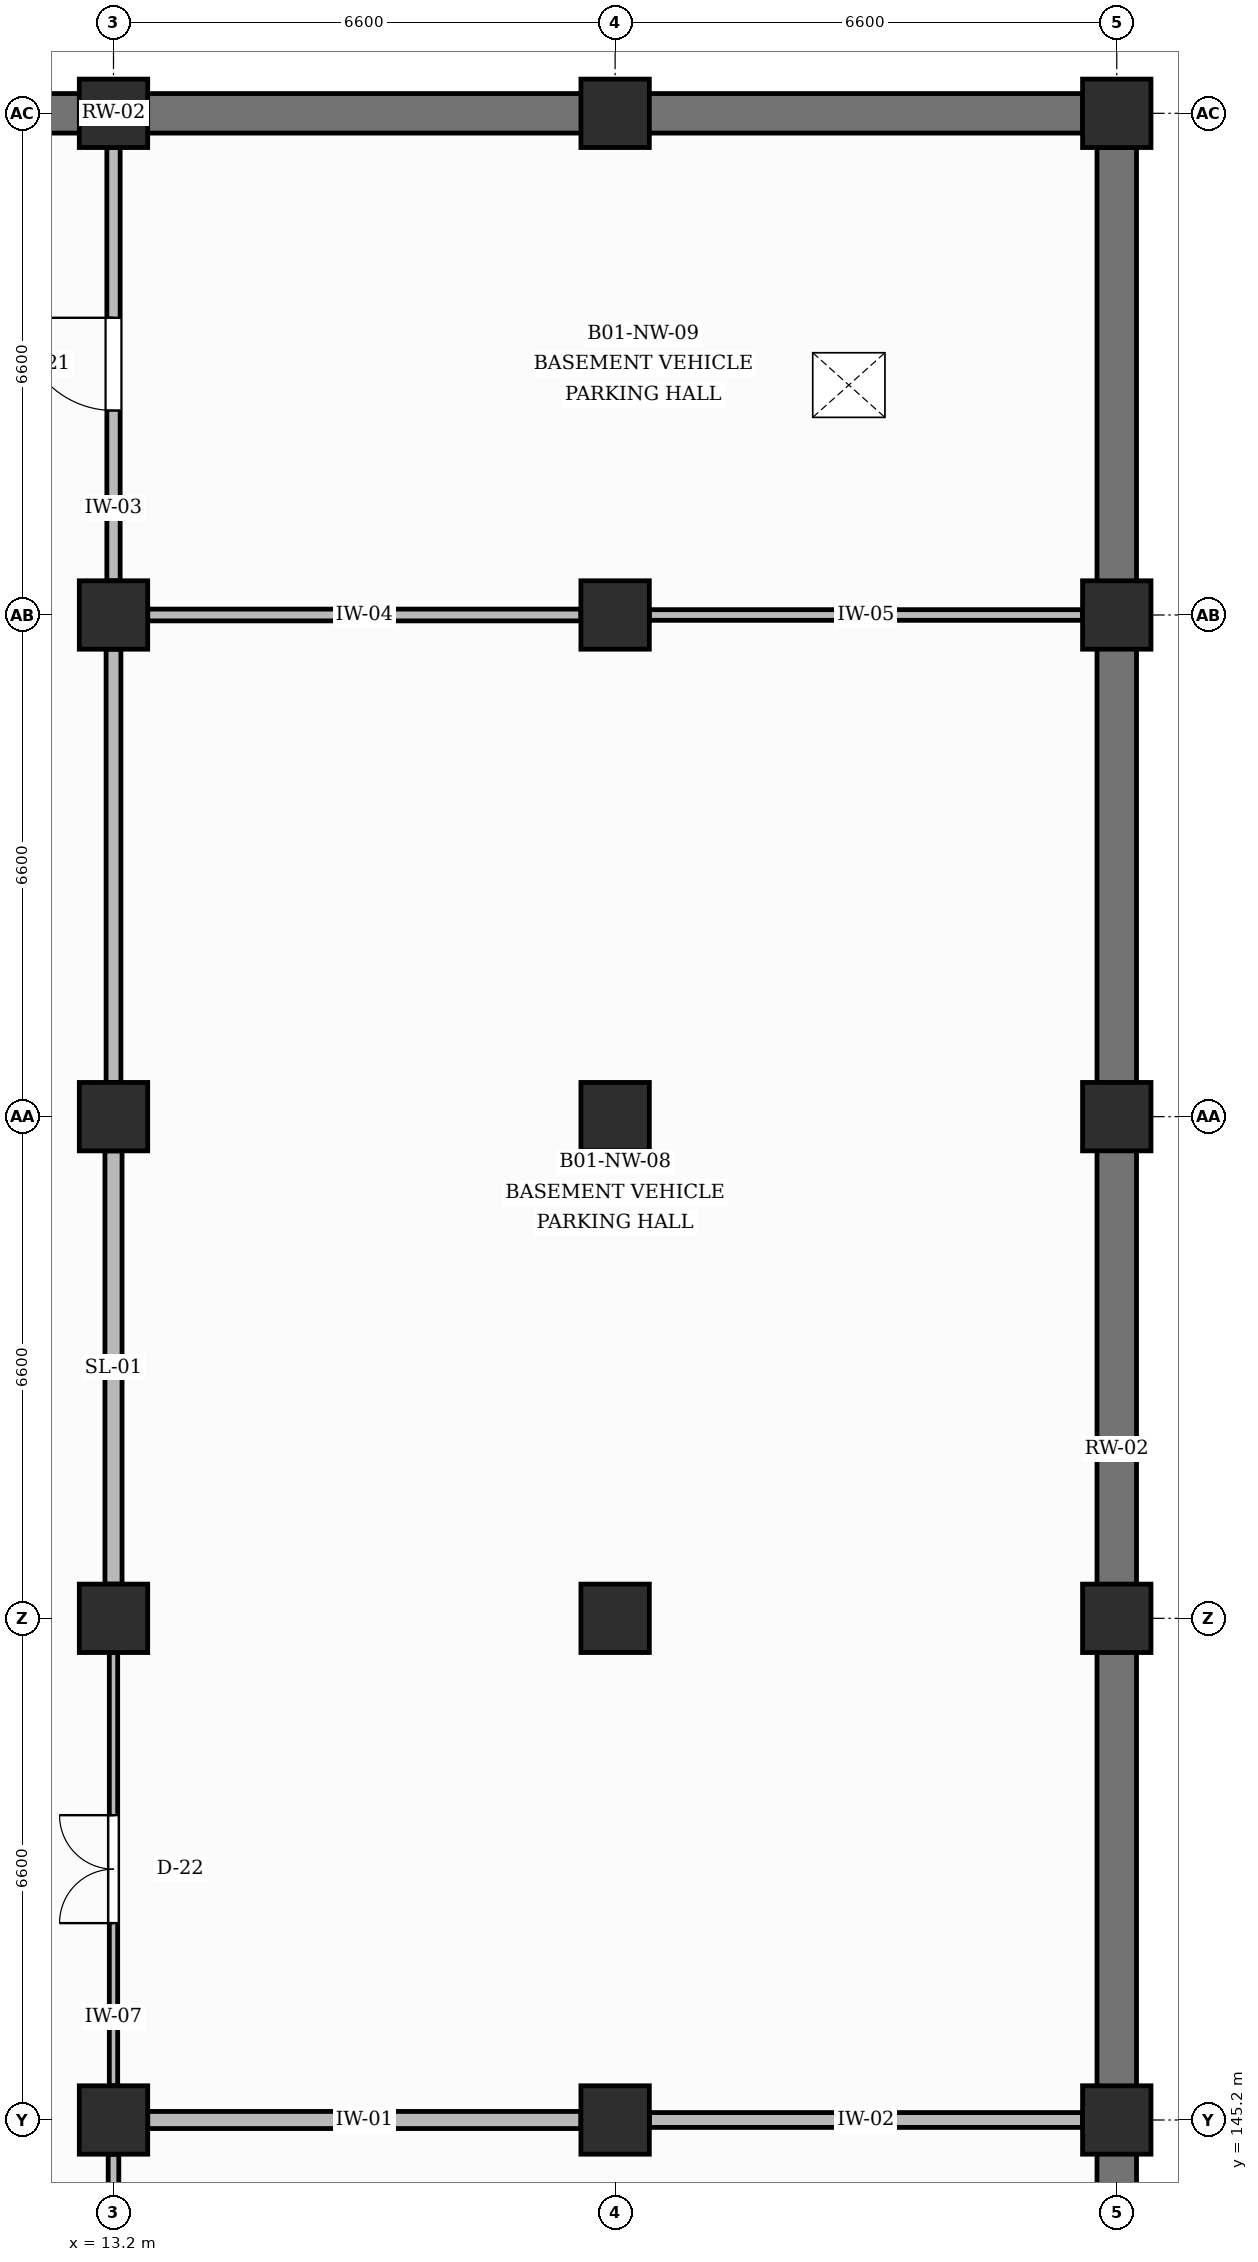
"""IFC4 building model, lengths in metres.
Left out: names, types, materials, properties, quantities, classifications, styles, units other than length and angle.
Written with IfcOpenShell. Run it as: python <this file> out.ifc"""

import sys

from ifc_helpers import new_model, si_unit, direction, frame, frame_2d, origin, origin_2d, place, context, subcontext, project, spatial, rectangle, extrude, element, fill, save


model = new_model("IFC4")
c1 = context("Model", 3, precision=1e-05, world=origin(), true_north=direction((0.0, 1.0)))
c2 = subcontext(c1, "Body", "Model", "MODEL_VIEW")
j1 = project(units=[si_unit("LENGTHUNIT", "METRE"), si_unit("PLANEANGLEUNIT", "RADIAN")], contexts=[c1])
p1 = place(None, origin())
s1 = spatial("IfcSite", under=j1, at=p1, CompositionType="ELEMENT")
p2 = place(p1, origin())
s2 = spatial("IfcBuilding", under=s1, at=p2, CompositionType="ELEMENT")
p3 = place(p2, frame((0.0, 0.0, -4.5)))
s3 = spatial("IfcBuildingStorey", under=s2, at=p3, CompositionType="ELEMENT", Elevation=-4.5)
for number, where, z_axis, x_axis in (
    (1, (13.2, 145.2, 0.0), (0.0, 0.0, 1.0), (1.0, 0.0, 0.0)),
    (2, (13.2, 151.8, 0.0), (0.0, 0.0, 1.0), (1.0, 0.0, 0.0)),
    (3, (13.2, 158.4, 0.0), (0.0, 0.0, 1.0), (1.0, 0.0, 0.0)),
    (4, (13.2, 165.0, 0.0), (0.0, 0.0, 1.0), (1.0, 0.0, 0.0)),
    (5, (13.2, 171.6, 0.0), (0.0, 0.0, 1.0), (1.0, 0.0, 0.0)),
    (6, (19.8, 145.2, 0.0), (0.0, 0.0, 1.0), (1.0, 0.0, 0.0)),
    (7, (19.8, 151.8, 0.0), (0.0, 0.0, 1.0), (1.0, 0.0, 0.0)),
    (8, (19.8, 158.4, 0.0), (0.0, 0.0, 1.0), (1.0, 0.0, 0.0)),
    (9, (19.8, 165.0, 0.0), (0.0, 0.0, 1.0), (1.0, 0.0, 0.0)),
    (10, (19.8, 171.6, 0.0), (0.0, 0.0, 1.0), (1.0, 0.0, 0.0)),
    (11, (26.4, 145.2, 0.0), (0.0, 0.0, 1.0), (1.0, 0.0, 0.0)),
    (12, (26.4, 151.8, 0.0), (0.0, 0.0, 1.0), (1.0, 0.0, 0.0)),
    (13, (26.4, 158.4, 0.0), (0.0, 0.0, 1.0), (1.0, 0.0, 0.0)),
    (14, (26.4, 165.0, 0.0), (0.0, 0.0, 1.0), (1.0, 0.0, 0.0)),
    (15, (26.4, 171.6, 0.0), (0.0, 0.0, 1.0), (1.0, 0.0, 0.0)),
):
    element("IfcColumn", number, at=place(p3, frame(where, z_axis=z_axis, x_axis=x_axis)), inside=s3, PredefinedType="COLUMN", context=c2, shape_type="SweptSolid", body=[
        extrude(rectangle(XDim=0.9, YDim=0.9, at=origin_2d()), origin(), (0.0, 0.0, 1.0), 4.5),
    ])
p4 = place(p3, frame((7.05, 171.6, 0.0), z_axis=(0.0, 0.0, 1.0), x_axis=(1.0, 0.0, 0.0)))
e16 = element("IfcWall", 16, at=p4, inside=s3, PredefinedType="USERDEFINED", context=c2, shape_type="SweptSolid", body=[
    extrude(rectangle(XDim=5.7, YDim=0.52, at=frame_2d((2.85, 0.0))), origin(), (0.0, 0.0, 1.0), 3.49),
])
p5 = place(p3, frame((13.65, 171.6, 0.0), z_axis=(0.0, 0.0, 1.0), x_axis=(1.0, 0.0, 0.0)))
e17 = element("IfcWall", 17, at=p5, inside=s3, PredefinedType="USERDEFINED", context=c2, shape_type="SweptSolid", body=[
    extrude(rectangle(XDim=5.7, YDim=0.52, at=frame_2d((2.85, 0.0))), origin(), (0.0, 0.0, 1.0), 3.49),
])
p6 = place(p3, frame((26.4, 139.05, 0.0), z_axis=(0.0, 0.0, 1.0), x_axis=(0.0, 1.0, 0.0)))
e18 = element("IfcWall", 18, at=p6, inside=s3, PredefinedType="USERDEFINED", context=c2, shape_type="SweptSolid", body=[
    extrude(rectangle(XDim=5.7, YDim=0.52, at=frame_2d((2.85, 0.0))), origin(), (0.0, 0.0, 1.0), 3.49),
])
p7 = place(p3, frame((26.4, 145.65, 0.0), z_axis=(0.0, 0.0, 1.0), x_axis=(0.0, 1.0, 0.0)))
e19 = element("IfcWall", 19, at=p7, inside=s3, PredefinedType="USERDEFINED", context=c2, shape_type="SweptSolid", body=[
    extrude(rectangle(XDim=5.7, YDim=0.52, at=frame_2d((2.85, 0.0))), origin(), (0.0, 0.0, 1.0), 3.49),
])
for number, where, z_axis, x_axis in (
    (20, (26.4, 152.25, 0.0), (0.0, 0.0, 1.0), (0.0, 1.0, 0.0)),
    (21, (26.4, 158.85, 0.0), (0.0, 0.0, 1.0), (0.0, 1.0, 0.0)),
    (22, (20.25, 171.6, 0.0), (0.0, 0.0, 1.0), (1.0, 0.0, 0.0)),
    (23, (26.4, 165.45, 0.0), (0.0, 0.0, 1.0), (0.0, 1.0, 0.0)),
):
    element("IfcWall", number, at=place(p3, frame(where, z_axis=z_axis, x_axis=x_axis)), inside=s3, PredefinedType="USERDEFINED", context=c2, shape_type="SweptSolid", body=[
        extrude(rectangle(XDim=5.7, YDim=0.52, at=frame_2d((2.85, 0.0))), origin(), (0.0, 0.0, 1.0), 3.49),
    ])
p8 = place(p3, frame((13.2, 139.05, 0.0), z_axis=(0.0, 0.0, 1.0), x_axis=(0.0, 1.0, 0.0)))
e24 = element("IfcWall", 24, at=p8, inside=s3, PredefinedType="PARTITIONING", context=c2, shape_type="SweptSolid", body=[
    extrude(rectangle(XDim=5.7, YDim=0.14, at=frame_2d((2.85, 0.0))), origin(), (0.0, 0.0, 1.0), 3.34),
])
p9 = place(p3, frame((13.2, 145.65, 0.0), z_axis=(0.0, 0.0, 1.0), x_axis=(0.0, 1.0, 0.0)))
e25 = element("IfcWall", 25, at=p9, inside=s3, PredefinedType="PARTITIONING", context=c2, shape_type="SweptSolid", body=[
    extrude(rectangle(XDim=5.7, YDim=0.11, at=frame_2d((2.85, 0.0))), origin(), (0.0, 0.0, 1.0), 3.34),
])
p10 = place(p9, frame((2.14, 0.0, 0.0)))
e26 = element("IfcOpeningElement", 26, at=p10, cuts=e25, PredefinedType="OPENING", context=c2, shape_type="SweptSolid", body=[
    extrude(rectangle(XDim=1.42, YDim=2.2, at=frame_2d((0.71, 1.1))), frame((0.0, 0.065, 0.0), z_axis=(0.0, -1.0, 0.0), x_axis=(1.0, 0.0, 0.0)), (0.0, 0.0, 1.0), 0.13),
])
p11 = place(p3, frame((13.2, 152.25, 0.0), z_axis=(0.0, 0.0, 1.0), x_axis=(0.0, 1.0, 0.0)))
e27 = element("IfcWall", 27, at=p11, inside=s3, PredefinedType="PARTITIONING", context=c2, shape_type="SweptSolid", body=[
    extrude(rectangle(XDim=5.7, YDim=0.225, at=frame_2d((2.85, 0.0))), origin(), (0.0, 0.0, 1.0), 3.34),
])
p12 = place(p3, frame((13.2, 158.85, 0.0), z_axis=(0.0, 0.0, 1.0), x_axis=(0.0, 1.0, 0.0)))
e28 = element("IfcWall", 28, at=p12, inside=s3, PredefinedType="PARTITIONING", context=c2, shape_type="SweptSolid", body=[
    extrude(rectangle(XDim=5.7, YDim=0.195, at=frame_2d((2.85, 0.0))), origin(), (0.0, 0.0, 1.0), 3.34),
])
p13 = place(p3, frame((13.2, 165.45, 0.0), z_axis=(0.0, 0.0, 1.0), x_axis=(0.0, 1.0, 0.0)))
e29 = element("IfcWall", 29, at=p13, inside=s3, PredefinedType="PARTITIONING", context=c2, shape_type="SweptSolid", body=[
    extrude(rectangle(XDim=5.7, YDim=0.175, at=frame_2d((2.85, 0.0))), origin(), (0.0, 0.0, 1.0), 3.34),
])
p14 = place(p13, frame((2.24, 0.0, 0.0)))
e30 = element("IfcOpeningElement", 30, at=p14, cuts=e29, PredefinedType="OPENING", context=c2, shape_type="SweptSolid", body=[
    extrude(rectangle(XDim=1.22, YDim=2.15, at=frame_2d((0.61, 1.075))), frame((0.0, 0.097, 0.0), z_axis=(0.0, -1.0, 0.0), x_axis=(1.0, 0.0, 0.0)), (0.0, 0.0, 1.0), 0.195),
])
p15 = place(p3, frame((13.65, 145.2, 0.0), z_axis=(0.0, 0.0, 1.0), x_axis=(1.0, 0.0, 0.0)))
e31 = element("IfcWall", 31, at=p15, inside=s3, PredefinedType="PARTITIONING", context=c2, shape_type="SweptSolid", body=[
    extrude(rectangle(XDim=5.7, YDim=0.225, at=frame_2d((2.85, 0.0))), origin(), (0.0, 0.0, 1.0), 3.24),
])
p16 = place(p3, frame((13.65, 165.0, 0.0), z_axis=(0.0, 0.0, 1.0), x_axis=(1.0, 0.0, 0.0)))
e32 = element("IfcWall", 32, at=p16, inside=s3, PredefinedType="PARTITIONING", context=c2, shape_type="SweptSolid", body=[
    extrude(rectangle(XDim=5.7, YDim=0.155, at=frame_2d((2.85, 0.0))), origin(), (0.0, 0.0, 1.0), 3.34),
])
p17 = place(p3, frame((20.25, 145.2, 0.0), z_axis=(0.0, 0.0, 1.0), x_axis=(1.0, 0.0, 0.0)))
e33 = element("IfcWall", 33, at=p17, inside=s3, PredefinedType="PARTITIONING", context=c2, shape_type="SweptSolid", body=[
    extrude(rectangle(XDim=5.7, YDim=0.195, at=frame_2d((2.85, 0.0))), origin(), (0.0, 0.0, 1.0), 3.34),
])
p18 = place(p3, frame((20.25, 165.0, 0.0), z_axis=(0.0, 0.0, 1.0), x_axis=(1.0, 0.0, 0.0)))
e34 = element("IfcWall", 34, at=p18, inside=s3, PredefinedType="PARTITIONING", context=c2, shape_type="SweptSolid", body=[
    extrude(rectangle(XDim=5.7, YDim=0.14, at=frame_2d((2.85, 0.0))), origin(), (0.0, 0.0, 1.0), 3.24),
])
p19 = place(p10, origin())
e35 = element("IfcDoor", 35, at=p19, inside=s3, OperationType="DOUBLE_DOOR_SINGLE_SWING", PredefinedType="DOOR", context=c2, shape_type="SweptSolid", body=[
    extrude(rectangle(XDim=1.42, YDim=2.2, at=frame_2d((0.71, 1.1))), frame((0.0, 0.025, 0.0), z_axis=(0.0, -1.0, 0.0), x_axis=(1.0, 0.0, 0.0)), (0.0, 0.0, 1.0), 0.05),
])
fill(e26, e35)
p20 = place(p14, origin())
e36 = element("IfcDoor", 36, at=p20, inside=s3, OperationType="SINGLE_SWING_RIGHT", PredefinedType="DOOR", context=c2, shape_type="SweptSolid", body=[
    extrude(rectangle(XDim=1.22, YDim=2.15, at=frame_2d((0.61, 1.075))), frame((0.0, 0.025, 0.0), z_axis=(0.0, -1.0, 0.0), x_axis=(1.0, 0.0, 0.0)), (0.0, 0.0, 1.0), 0.05),
])
fill(e30, e36)
save(model, sys.argv[1])
